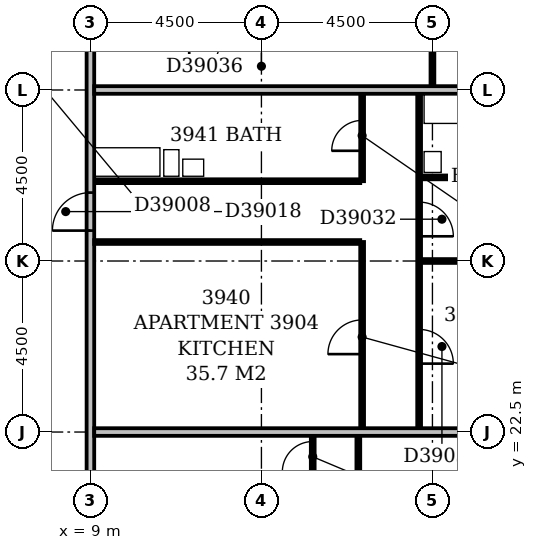
"""IFC4 building model, lengths in metres.
Left out: names, types, materials, properties, quantities, classifications, styles, units other than length and angle.
Written with IfcOpenShell. Run it as: python <this file> out.ifc"""

import sys

from ifc_helpers import new_model, si_unit, direction, frame, frame_2d, origin, place, context, subcontext, project, spatial, rectangle, extrude, element, fill, save


model = new_model("IFC4")
c1 = context("Model", 3, precision=1e-05, world=origin(), true_north=direction((0.0, 1.0)))
c2 = subcontext(c1, "Body", "Model", "MODEL_VIEW")
j1 = project(units=[si_unit("LENGTHUNIT", "METRE"), si_unit("PLANEANGLEUNIT", "RADIAN")], contexts=[c1])
p1 = place(None, origin())
s1 = spatial("IfcSite", under=j1, at=p1, CompositionType="ELEMENT")
p2 = place(p1, origin())
s2 = spatial("IfcBuilding", under=s1, at=p2, CompositionType="ELEMENT")
p3 = place(p2, frame((0.0, 0.0, 155.6)))
s3 = spatial("IfcBuildingStorey", under=s2, at=p3, CompositionType="ELEMENT", Elevation=155.6)
p4 = place(p3, frame((9.0, 5.0, 0.0), z_axis=(0.0, 0.0, 1.0), x_axis=(0.0, 1.0, 0.0)))
e1 = element("IfcWall", 1, at=p4, inside=s3, PredefinedType="PARTITIONING", context=c2, shape_type="SweptSolid", body=[
    extrude(rectangle(XDim=27.75, YDim=0.2, at=frame_2d((13.875, 0.0))), origin(), (0.0, 0.0, 1.0), 3.3),
])
p5 = place(p4, frame((22.8, 0.0, 0.0)))
e2 = element("IfcOpeningElement", 2, at=p5, cuts=e1, PredefinedType="OPENING", context=c2, shape_type="SweptSolid", body=[
    extrude(rectangle(XDim=1.0, YDim=2.1, at=frame_2d((0.5, 1.05))), frame((0.0, 0.112, 0.0), z_axis=(0.0, -1.0, 0.0), x_axis=(1.0, 0.0, 0.0)), (0.0, 0.0, 1.0), 0.224),
])
p6 = place(p4, frame((14.95, 0.0, 0.0)))
e3 = element("IfcOpeningElement", 3, at=p6, cuts=e1, PredefinedType="OPENING", context=c2, shape_type="SweptSolid", body=[
    extrude(rectangle(XDim=1.0, YDim=2.1, at=frame_2d((0.5, 1.05))), frame((0.0, 0.112, 0.0), z_axis=(0.0, -1.0, 0.0), x_axis=(1.0, 0.0, 0.0)), (0.0, 0.0, 1.0), 0.224),
])
p7 = place(p4, frame((9.3, 0.0, 0.0)))
e4 = element("IfcOpeningElement", 4, at=p7, cuts=e1, PredefinedType="OPENING", context=c2, shape_type="SweptSolid", body=[
    extrude(rectangle(XDim=1.0, YDim=2.1, at=frame_2d((0.5, 1.05))), frame((0.0, 0.112, 0.0), z_axis=(0.0, -1.0, 0.0), x_axis=(1.0, 0.0, 0.0)), (0.0, 0.0, 1.0), 0.224),
])
p8 = place(p4, frame((1.5, 0.0, 0.0)))
e5 = element("IfcOpeningElement", 5, at=p8, cuts=e1, PredefinedType="OPENING", context=c2, shape_type="SweptSolid", body=[
    extrude(rectangle(XDim=0.9, YDim=2.1, at=frame_2d((0.45, 1.05))), frame((0.0, 0.112, 0.0), z_axis=(0.0, -1.0, 0.0), x_axis=(1.0, 0.0, 0.0)), (0.0, 0.0, 1.0), 0.224),
])
p9 = place(p3, frame((16.05, 18.1, 0.0), z_axis=(0.0, 0.0, 1.0), x_axis=(0.0, 1.0, 0.0)))
e6 = element("IfcWall", 6, at=p9, inside=s3, PredefinedType="PARTITIONING", context=c2, shape_type="SweptSolid", body=[
    extrude(rectangle(XDim=4.3, YDim=0.1, at=frame_2d((2.15, 0.0))), origin(), (0.0, 0.0, 1.0), 3.3),
])
p10 = place(p9, frame((1.7, 0.0, 0.0)))
e7 = element("IfcOpeningElement", 7, at=p10, cuts=e6, PredefinedType="OPENING", context=c2, shape_type="SweptSolid", body=[
    extrude(rectangle(XDim=0.9, YDim=2.1, at=frame_2d((0.45, 1.05))), frame((0.0, 0.062, 0.0), z_axis=(0.0, -1.0, 0.0), x_axis=(1.0, 0.0, 0.0)), (0.0, 0.0, 1.0), 0.124),
])
p11 = place(p3, frame((14.85, 21.2, 0.0), z_axis=(0.0, 0.0, 1.0), x_axis=(0.0, 1.0, 0.0)))
e8 = element("IfcWall", 8, at=p11, inside=s3, PredefinedType="PARTITIONING", context=c2, shape_type="SweptSolid", body=[
    extrude(rectangle(XDim=1.2, YDim=0.1, at=frame_2d((0.6, 0.0))), origin(), (0.0, 0.0, 1.0), 3.3),
])
p12 = place(p11, frame((0.25, 0.0, 0.0)))
e9 = element("IfcOpeningElement", 9, at=p12, cuts=e8, PredefinedType="OPENING", context=c2, shape_type="SweptSolid", body=[
    extrude(rectangle(XDim=0.8, YDim=2.1, at=frame_2d((0.4, 1.05))), frame((0.0, 0.062, 0.0), z_axis=(0.0, -1.0, 0.0), x_axis=(1.0, 0.0, 0.0)), (0.0, 0.0, 1.0), 0.124),
])
p13 = place(p3, frame((9.1, 22.5, 0.0), z_axis=(0.0, 0.0, 1.0), x_axis=(1.0, 0.0, 0.0)))
e10 = element("IfcWall", 10, at=p13, inside=s3, PredefinedType="PARTITIONING", context=c2, shape_type="SweptSolid", body=[
    extrude(rectangle(XDim=12.9, YDim=0.2, at=frame_2d((6.45, 0.0))), origin(), (0.0, 0.0, 1.0), 3.3),
])
p14 = place(p3, frame((16.15, 22.6, 0.0), z_axis=(0.0, 0.0, 1.0), x_axis=(0.0, 1.0, 0.0)))
e11 = element("IfcWall", 11, at=p14, inside=s3, PredefinedType="PARTITIONING", context=c2, shape_type="SweptSolid", body=[
    extrude(rectangle(XDim=4.9, YDim=0.1, at=frame_2d((2.45, 0.0))), origin(), (0.0, 0.0, 1.0), 3.3),
])
p15 = place(p14, frame((1.95, 0.0, 0.0)))
e12 = element("IfcOpeningElement", 12, at=p15, cuts=e11, PredefinedType="OPENING", context=c2, shape_type="SweptSolid", body=[
    extrude(rectangle(XDim=0.9, YDim=2.1, at=frame_2d((0.45, 1.05))), frame((0.0, 0.062, 0.0), z_axis=(0.0, -1.0, 0.0), x_axis=(1.0, 0.0, 0.0)), (0.0, 0.0, 1.0), 0.124),
])
p16 = place(p3, frame((17.65, 22.6, 0.0), z_axis=(0.0, 0.0, 1.0), x_axis=(0.0, 1.0, 0.0)))
e13 = element("IfcWall", 13, at=p16, inside=s3, PredefinedType="PARTITIONING", context=c2, shape_type="SweptSolid", body=[
    extrude(rectangle(XDim=8.8, YDim=0.1, at=frame_2d((4.4, 0.0))), origin(), (0.0, 0.0, 1.0), 3.3),
])
p17 = place(p16, frame((1.7, 0.0, 0.0)))
e14 = element("IfcOpeningElement", 14, at=p17, cuts=e13, PredefinedType="OPENING", context=c2, shape_type="SweptSolid", body=[
    extrude(rectangle(XDim=0.9, YDim=2.1, at=frame_2d((0.45, 1.05))), frame((0.0, 0.062, 0.0), z_axis=(0.0, -1.0, 0.0), x_axis=(1.0, 0.0, 0.0)), (0.0, 0.0, 1.0), 0.124),
])
p18 = place(p16, frame((5.05, 0.0, 0.0)))
e15 = element("IfcOpeningElement", 15, at=p18, cuts=e13, PredefinedType="OPENING", context=c2, shape_type="SweptSolid", body=[
    extrude(rectangle(XDim=0.9, YDim=2.1, at=frame_2d((0.45, 1.05))), frame((0.0, 0.062, 0.0), z_axis=(0.0, -1.0, 0.0), x_axis=(1.0, 0.0, 0.0)), (0.0, 0.0, 1.0), 0.124),
])
p19 = place(p3, frame((17.7, 27.0, 0.0), z_axis=(0.0, 0.0, 1.0), x_axis=(1.0, 0.0, 0.0)))
e16 = element("IfcWall", 16, at=p19, inside=s3, PredefinedType="PARTITIONING", context=c2, shape_type="SweptSolid", body=[
    extrude(rectangle(XDim=4.3, YDim=0.1, at=frame_2d((2.15, 0.0))), origin(), (0.0, 0.0, 1.0), 2.7),
])
p20 = place(p3, frame((9.1, 27.5, 0.0), z_axis=(0.0, 0.0, 1.0), x_axis=(1.0, 0.0, 0.0)))
e17 = element("IfcWall", 17, at=p20, inside=s3, PredefinedType="PARTITIONING", context=c2, shape_type="SweptSolid", body=[
    extrude(rectangle(XDim=7.0, YDim=0.1, at=frame_2d((3.5, 0.0))), origin(), (0.0, 0.0, 1.0), 2.7),
])
p21 = place(p3, frame((9.1, 29.1, 0.0), z_axis=(0.0, 0.0, 1.0), x_axis=(1.0, 0.0, 0.0)))
e18 = element("IfcWall", 18, at=p21, inside=s3, PredefinedType="PLUMBINGWALL", context=c2, shape_type="SweptSolid", body=[
    extrude(rectangle(XDim=7.0, YDim=0.1, at=frame_2d((3.5, 0.0))), origin(), (0.0, 0.0, 1.0), 3.3),
])
p22 = place(p3, frame((16.15, 29.1, 0.0), z_axis=(0.0, 0.0, 1.0), x_axis=(0.0, 1.0, 0.0)))
e19 = element("IfcWall", 19, at=p22, inside=s3, PredefinedType="PARTITIONING", context=c2, shape_type="SweptSolid", body=[
    extrude(rectangle(XDim=2.3, YDim=0.1, at=frame_2d((1.15, 0.0))), origin(), (0.0, 0.0, 1.0), 3.3),
])
p23 = place(p22, frame((0.8, 0.0, 0.0)))
e20 = element("IfcOpeningElement", 20, at=p23, cuts=e19, PredefinedType="OPENING", context=c2, shape_type="SweptSolid", body=[
    extrude(rectangle(XDim=0.8, YDim=2.1, at=frame_2d((0.4, 1.05))), frame((0.0, 0.062, 0.0), z_axis=(0.0, -1.0, 0.0), x_axis=(1.0, 0.0, 0.0)), (0.0, 0.0, 1.0), 0.124),
])
p24 = place(p3, frame((17.7, 29.2, 0.0), z_axis=(0.0, 0.0, 1.0), x_axis=(1.0, 0.0, 0.0)))
e21 = element("IfcWall", 21, at=p24, inside=s3, PredefinedType="PLUMBINGWALL", context=c2, shape_type="SweptSolid", body=[
    extrude(rectangle(XDim=2.8, YDim=0.1, at=frame_2d((1.4, 0.0))), origin(), (0.0, 0.0, 1.0), 3.3),
])
p25 = place(p24, frame((1.0, 0.0, 0.0)))
e22 = element("IfcOpeningElement", 22, at=p25, cuts=e21, PredefinedType="OPENING", context=c2, shape_type="SweptSolid", body=[
    extrude(rectangle(XDim=0.8, YDim=2.1, at=frame_2d((0.4, 1.05))), frame((0.0, 0.062, 0.0), z_axis=(0.0, -1.0, 0.0), x_axis=(1.0, 0.0, 0.0)), (0.0, 0.0, 1.0), 0.124),
])
p26 = place(p3, frame((9.1, 31.5, 0.0), z_axis=(0.0, 0.0, 1.0), x_axis=(1.0, 0.0, 0.0)))
e23 = element("IfcWall", 23, at=p26, inside=s3, PredefinedType="PARTITIONING", context=c2, shape_type="SweptSolid", body=[
    extrude(rectangle(XDim=12.9, YDim=0.2, at=frame_2d((6.45, 0.0))), origin(), (0.0, 0.0, 1.0), 3.3),
])
p27 = place(p3, frame((18.0, 31.6, 0.0), z_axis=(0.0, 0.0, 1.0), x_axis=(0.0, 1.0, 0.0)))
e24 = element("IfcWall", 24, at=p27, inside=s3, PredefinedType="PARTITIONING", context=c2, shape_type="SweptSolid", body=[
    extrude(rectangle(XDim=4.3, YDim=0.1, at=frame_2d((2.15, 0.0))), origin(), (0.0, 0.0, 1.0), 3.3),
])
p28 = place(p27, frame((1.7, 0.0, 0.0)))
e25 = element("IfcOpeningElement", 25, at=p28, cuts=e24, PredefinedType="OPENING", context=c2, shape_type="SweptSolid", body=[
    extrude(rectangle(XDim=0.9, YDim=2.1, at=frame_2d((0.45, 1.05))), frame((0.0, 0.062, 0.0), z_axis=(0.0, -1.0, 0.0), x_axis=(1.0, 0.0, 0.0)), (0.0, 0.0, 1.0), 0.124),
])
p29 = place(p5, origin())
e26 = element("IfcDoor", 26, at=p29, inside=s3, OperationType="SINGLE_SWING_LEFT", PredefinedType="DOOR", context=c2, shape_type="SweptSolid", body=[
    extrude(rectangle(XDim=1.0, YDim=2.1, at=frame_2d((0.5, 1.05))), frame((0.0, 0.025, 0.0), z_axis=(0.0, -1.0, 0.0), x_axis=(1.0, 0.0, 0.0)), (0.0, 0.0, 1.0), 0.05),
])
fill(e2, e26)
p30 = place(p12, origin())
e27 = element("IfcDoor", 27, at=p30, inside=s3, OperationType="SINGLE_SWING_LEFT", PredefinedType="DOOR", context=c2, shape_type="SweptSolid", body=[
    extrude(rectangle(XDim=0.8, YDim=2.1, at=frame_2d((0.4, 1.05))), frame((0.0, 0.025, 0.0), z_axis=(0.0, -1.0, 0.0), x_axis=(1.0, 0.0, 0.0)), (0.0, 0.0, 1.0), 0.05),
])
fill(e9, e27)
p31 = place(p15, origin())
e28 = element("IfcDoor", 28, at=p31, inside=s3, OperationType="SINGLE_SWING_LEFT", PredefinedType="DOOR", context=c2, shape_type="SweptSolid", body=[
    extrude(rectangle(XDim=0.9, YDim=2.1, at=frame_2d((0.45, 1.05))), frame((0.0, 0.025, 0.0), z_axis=(0.0, -1.0, 0.0), x_axis=(1.0, 0.0, 0.0)), (0.0, 0.0, 1.0), 0.05),
])
fill(e12, e28)
p32 = place(p17, frame((0.9, 0.0, 0.0), z_axis=(0.0, 0.0, 1.0), x_axis=(-1.0, 0.0, 0.0)))
e29 = element("IfcDoor", 29, at=p32, inside=s3, OperationType="SINGLE_SWING_RIGHT", PredefinedType="DOOR", context=c2, shape_type="SweptSolid", body=[
    extrude(rectangle(XDim=0.9, YDim=2.1, at=frame_2d((0.45, 1.05))), frame((0.0, 0.025, 0.0), z_axis=(0.0, -1.0, 0.0), x_axis=(1.0, 0.0, 0.0)), (0.0, 0.0, 1.0), 0.05),
])
fill(e14, e29)
p33 = place(p18, frame((0.9, 0.0, 0.0), z_axis=(0.0, 0.0, 1.0), x_axis=(-1.0, 0.0, 0.0)))
e30 = element("IfcDoor", 30, at=p33, inside=s3, OperationType="SINGLE_SWING_RIGHT", PredefinedType="DOOR", context=c2, shape_type="SweptSolid", body=[
    extrude(rectangle(XDim=0.9, YDim=2.1, at=frame_2d((0.45, 1.05))), frame((0.0, 0.025, 0.0), z_axis=(0.0, -1.0, 0.0), x_axis=(1.0, 0.0, 0.0)), (0.0, 0.0, 1.0), 0.05),
])
fill(e15, e30)
p34 = place(p23, origin())
e31 = element("IfcDoor", 31, at=p34, inside=s3, OperationType="SINGLE_SWING_LEFT", PredefinedType="DOOR", context=c2, shape_type="SweptSolid", body=[
    extrude(rectangle(XDim=0.8, YDim=2.1, at=frame_2d((0.4, 1.05))), frame((0.0, 0.025, 0.0), z_axis=(0.0, -1.0, 0.0), x_axis=(1.0, 0.0, 0.0)), (0.0, 0.0, 1.0), 0.05),
])
fill(e20, e31)
save(model, sys.argv[1])
